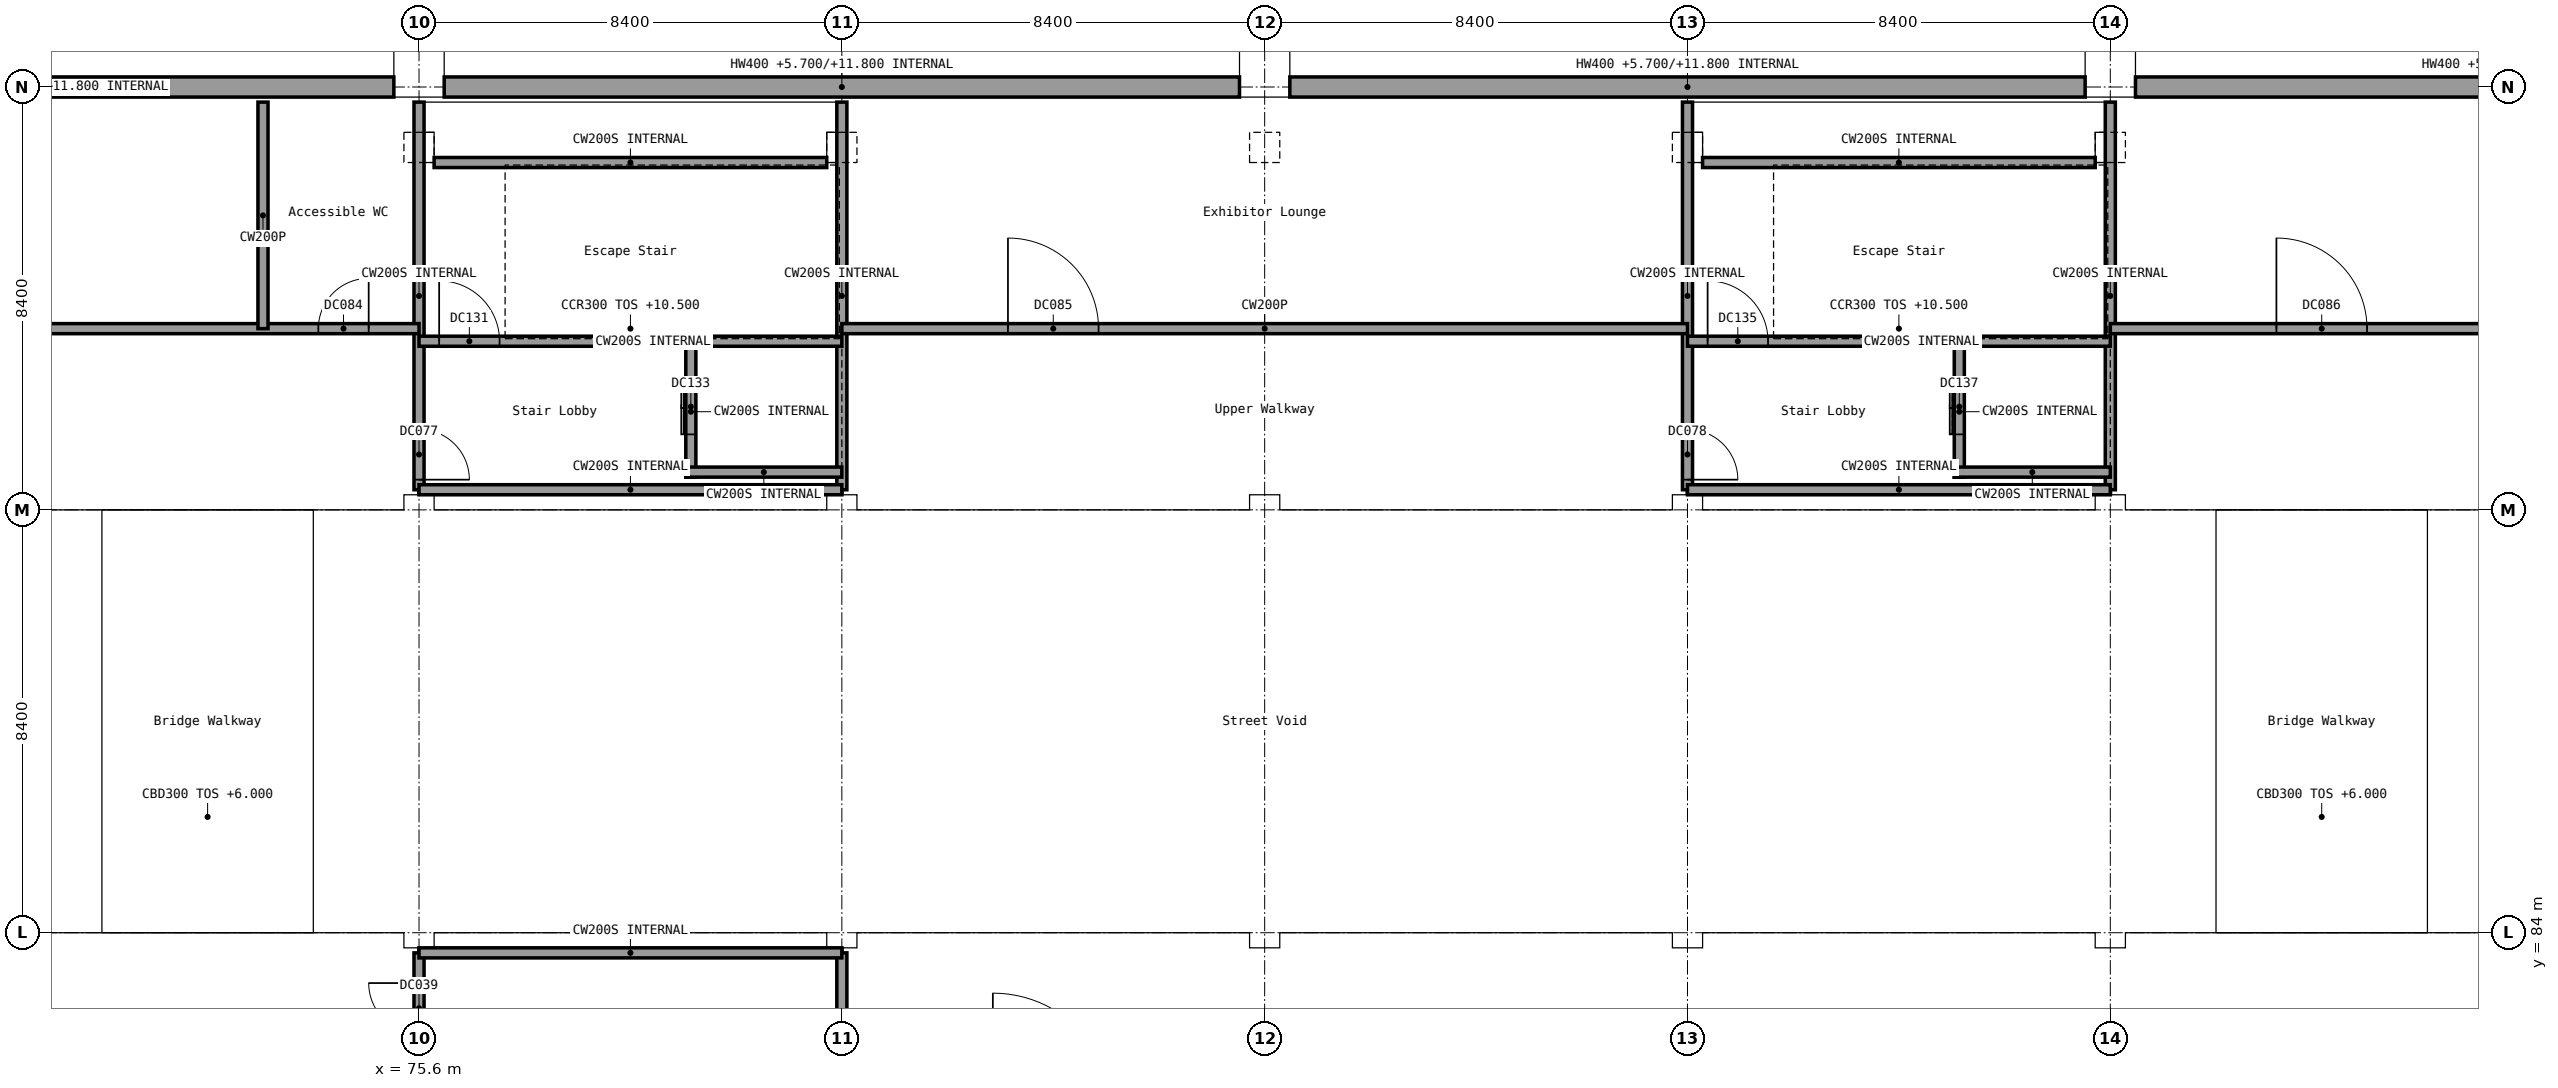
"""IFC4 building model, lengths in metres.
Left out: names, types, materials, properties, quantities, classifications, styles, units other than length and angle.
Written with IfcOpenShell. Run it as: python <this file> out.ifc"""

import sys

from ifc_helpers import new_model, si_unit, direction, frame, frame_2d, origin, origin_2d, place, context, subcontext, project, spatial, rectangle, extrude, element, fill, save


model = new_model("IFC4")
c1 = context("Model", 3, precision=1e-05, world=origin(), true_north=direction((0.0, 1.0)))
c2 = subcontext(c1, "Body", "Model", "MODEL_VIEW")
j1 = project(units=[si_unit("LENGTHUNIT", "METRE"), si_unit("PLANEANGLEUNIT", "RADIAN")], contexts=[c1])
p1 = place(None, origin())
s1 = spatial("IfcSite", under=j1, at=p1, CompositionType="ELEMENT")
p2 = place(p1, origin())
s2 = spatial("IfcBuilding", under=s1, at=p2, CompositionType="ELEMENT")
p3 = place(p2, frame((0.0, 0.0, 6.0)))
s3 = spatial("IfcBuildingStorey", under=s2, at=p3, CompositionType="ELEMENT", Elevation=6.0)
for number, where, z_axis, x_axis in (
    (1, (75.6, 100.8, 0.0), (0.0, 0.0, 1.0), (1.0, 0.0, 0.0)),
    (2, (92.4, 100.8, 0.0), (0.0, 0.0, 1.0), (1.0, 0.0, 0.0)),
    (3, (109.2, 100.8, 0.0), (0.0, 0.0, 1.0), (1.0, 0.0, 0.0)),
):
    element("IfcColumn", number, at=place(p3, frame(where, z_axis=z_axis, x_axis=x_axis)), inside=s3, PredefinedType="COLUMN", context=c2, shape_type="SweptSolid", body=[
        extrude(rectangle(XDim=1.0, YDim=1.6, at=origin_2d()), origin(), (0.0, 0.0, 1.0), 4.5),
    ])
p4 = place(p3, frame((59.3, 100.8, -0.3), z_axis=(0.0, 0.0, 1.0), x_axis=(1.0, 0.0, 0.0)))
e4 = element("IfcWall", 4, at=p4, inside=s3, PredefinedType="STANDARD", context=c2, shape_type="SweptSolid", body=[
    extrude(rectangle(XDim=15.8, YDim=0.4, at=frame_2d((7.9, 0.0))), origin(), (0.0, 0.0, 1.0), 6.1),
])
p5 = place(p3, frame((76.1, 100.8, -0.3), z_axis=(0.0, 0.0, 1.0), x_axis=(1.0, 0.0, 0.0)))
e5 = element("IfcWall", 5, at=p5, inside=s3, PredefinedType="STANDARD", context=c2, shape_type="SweptSolid", body=[
    extrude(rectangle(XDim=15.8, YDim=0.4, at=frame_2d((7.9, 0.0))), origin(), (0.0, 0.0, 1.0), 6.1),
])
for number, where, z_axis, x_axis in (
    (6, (92.9, 100.8, -0.3), (0.0, 0.0, 1.0), (1.0, 0.0, 0.0)),
    (7, (109.7, 100.8, -0.3), (0.0, 0.0, 1.0), (1.0, 0.0, 0.0)),
):
    element("IfcWall", number, at=place(p3, frame(where, z_axis=z_axis, x_axis=x_axis)), inside=s3, PredefinedType="STANDARD", context=c2, shape_type="SweptSolid", body=[
        extrude(rectangle(XDim=15.8, YDim=0.4, at=frame_2d((7.9, 0.0))), origin(), (0.0, 0.0, 1.0), 6.1),
    ])
for number, where, z_axis, x_axis in (
    (8, (75.6, 99.6, 0.0), (0.0, 0.0, 1.0), (1.0, 0.0, 0.0)),
    (9, (84.0, 99.6, 0.0), (0.0, 0.0, 1.0), (1.0, 0.0, 0.0)),
    (10, (92.4, 99.6, 0.0), (0.0, 0.0, 1.0), (1.0, 0.0, 0.0)),
    (11, (100.8, 99.6, 0.0), (0.0, 0.0, 1.0), (1.0, 0.0, 0.0)),
    (12, (109.2, 99.6, 0.0), (0.0, 0.0, 1.0), (1.0, 0.0, 0.0)),
):
    element("IfcColumn", number, at=place(p3, frame(where, z_axis=z_axis, x_axis=x_axis)), inside=s3, PredefinedType="COLUMN", context=c2, shape_type="SweptSolid", body=[
        extrude(rectangle(XDim=0.6, YDim=0.6, at=origin_2d()), origin(), (0.0, 0.0, 1.0), 4.5),
    ])
p6 = place(p3, frame((75.6, 75.4, 0.0), z_axis=(0.0, 0.0, 1.0), x_axis=(0.0, 1.0, 0.0)))
e13 = element("IfcWall", 13, at=p6, inside=s3, PredefinedType="SOLIDWALL", context=c2, shape_type="SweptSolid", body=[
    extrude(rectangle(XDim=8.2, YDim=0.2, at=frame_2d((4.1, 0.0))), origin(), (0.0, 0.0, 1.0), 4.2),
])
p7 = place(p6, frame((6.6, 0.0, 0.0)))
e14 = element("IfcOpeningElement", 14, at=p7, cuts=e13, PredefinedType="OPENING", context=c2, shape_type="SweptSolid", body=[
    extrude(rectangle(XDim=1.0, YDim=2.4, at=frame_2d((0.5, 1.2))), frame((0.0, 0.1, 0.0), z_axis=(0.0, -1.0, 0.0), x_axis=(1.0, 0.0, 0.0)), (0.0, 0.0, 1.0), 0.2),
])
p8 = place(p3, frame((84.0, 75.4, 0.0), z_axis=(0.0, 0.0, 1.0), x_axis=(0.0, 1.0, 0.0)))
e15 = element("IfcWall", 15, at=p8, inside=s3, PredefinedType="SOLIDWALL", context=c2, shape_type="SweptSolid", body=[
    extrude(rectangle(XDim=8.2, YDim=0.2, at=frame_2d((4.1, 0.0))), origin(), (0.0, 0.0, 1.0), 4.2),
])
p9 = place(p3, frame((75.6, 83.6, 0.0), z_axis=(0.0, 0.0, 1.0), x_axis=(1.0, 0.0, 0.0)))
e16 = element("IfcWall", 16, at=p9, inside=s3, PredefinedType="SOLIDWALL", context=c2, shape_type="SweptSolid", body=[
    extrude(rectangle(XDim=8.4, YDim=0.2, at=frame_2d((4.2, 0.0))), origin(), (0.0, 0.0, 1.0), 4.2),
])
p10 = place(p3, frame((75.6, 100.5, 0.0), z_axis=(0.0, 0.0, 1.0), x_axis=(0.0, -1.0, 0.0)))
e17 = element("IfcWall", 17, at=p10, inside=s3, PredefinedType="SOLIDWALL", context=c2, shape_type="SweptSolid", body=[
    extrude(rectangle(XDim=7.7, YDim=0.2, at=frame_2d((3.85, 0.0))), origin(), (0.0, 0.0, 1.0), 4.2),
])
p11 = place(p10, frame((6.5, 0.0, 0.0)))
e18 = element("IfcOpeningElement", 18, at=p11, cuts=e17, PredefinedType="OPENING", context=c2, shape_type="SweptSolid", body=[
    extrude(rectangle(XDim=1.0, YDim=2.4, at=frame_2d((0.5, 1.2))), frame((0.0, 0.1, 0.0), z_axis=(0.0, -1.0, 0.0), x_axis=(1.0, 0.0, 0.0)), (0.0, 0.0, 1.0), 0.2),
])
p12 = place(p3, frame((84.0, 100.5, 0.0), z_axis=(0.0, 0.0, 1.0), x_axis=(0.0, -1.0, 0.0)))
e19 = element("IfcWall", 19, at=p12, inside=s3, PredefinedType="SOLIDWALL", context=c2, shape_type="SweptSolid", body=[
    extrude(rectangle(XDim=7.7, YDim=0.2, at=frame_2d((3.85, 0.0))), origin(), (0.0, 0.0, 1.0), 4.2),
])
p13 = place(p3, frame((100.8, 100.5, 0.0), z_axis=(0.0, 0.0, 1.0), x_axis=(0.0, -1.0, 0.0)))
e20 = element("IfcWall", 20, at=p13, inside=s3, PredefinedType="SOLIDWALL", context=c2, shape_type="SweptSolid", body=[
    extrude(rectangle(XDim=7.7, YDim=0.2, at=frame_2d((3.85, 0.0))), origin(), (0.0, 0.0, 1.0), 4.2),
])
p14 = place(p13, frame((6.5, 0.0, 0.0)))
e21 = element("IfcOpeningElement", 21, at=p14, cuts=e20, PredefinedType="OPENING", context=c2, shape_type="SweptSolid", body=[
    extrude(rectangle(XDim=1.0, YDim=2.4, at=frame_2d((0.5, 1.2))), frame((0.0, 0.1, 0.0), z_axis=(0.0, -1.0, 0.0), x_axis=(1.0, 0.0, 0.0)), (0.0, 0.0, 1.0), 0.2),
])
p15 = place(p3, frame((109.2, 100.5, 0.0), z_axis=(0.0, 0.0, 1.0), x_axis=(0.0, -1.0, 0.0)))
e22 = element("IfcWall", 22, at=p15, inside=s3, PredefinedType="SOLIDWALL", context=c2, shape_type="SweptSolid", body=[
    extrude(rectangle(XDim=7.7, YDim=0.2, at=frame_2d((3.85, 0.0))), origin(), (0.0, 0.0, 1.0), 4.2),
])
p16 = place(p3, frame((58.8, 96.0, 0.0), z_axis=(0.0, 0.0, 1.0), x_axis=(1.0, 0.0, 0.0)))
e23 = element("IfcWall", 23, at=p16, inside=s3, PredefinedType="PARTITIONING", context=c2, shape_type="SweptSolid", body=[
    extrude(rectangle(XDim=16.8, YDim=0.2, at=frame_2d((8.4, 0.0))), origin(), (0.0, 0.0, 1.0), 4.5),
])
p17 = place(p16, frame((3.3, 0.0, 0.0)))
e24 = element("IfcOpeningElement", 24, at=p17, cuts=e23, PredefinedType="OPENING", context=c2, shape_type="SweptSolid", body=[
    extrude(rectangle(XDim=1.8, YDim=2.4, at=frame_2d((0.9, 1.2))), frame((0.0, 0.1, 0.0), z_axis=(0.0, -1.0, 0.0), x_axis=(1.0, 0.0, 0.0)), (0.0, 0.0, 1.0), 0.2),
])
p18 = place(p16, frame((14.8, 0.0, 0.0)))
e25 = element("IfcOpeningElement", 25, at=p18, cuts=e23, PredefinedType="OPENING", context=c2, shape_type="SweptSolid", body=[
    extrude(rectangle(XDim=1.0, YDim=2.4, at=frame_2d((0.5, 1.2))), frame((0.0, 0.1, 0.0), z_axis=(0.0, -1.0, 0.0), x_axis=(1.0, 0.0, 0.0)), (0.0, 0.0, 1.0), 0.2),
])
p19 = place(p3, frame((72.5, 100.5, 0.0), z_axis=(0.0, 0.0, 1.0), x_axis=(0.0, -1.0, 0.0)))
e26 = element("IfcWall", 26, at=p19, inside=s3, PredefinedType="PARTITIONING", context=c2, shape_type="SweptSolid", body=[
    extrude(rectangle(XDim=4.5, YDim=0.2, at=frame_2d((2.25, 0.0))), origin(), (0.0, 0.0, 1.0), 4.5),
])
p20 = place(p3, frame((84.0, 96.0, 0.0), z_axis=(0.0, 0.0, 1.0), x_axis=(1.0, 0.0, 0.0)))
e27 = element("IfcWall", 27, at=p20, inside=s3, PredefinedType="PARTITIONING", context=c2, shape_type="SweptSolid", body=[
    extrude(rectangle(XDim=16.8, YDim=0.2, at=frame_2d((8.4, 0.0))), origin(), (0.0, 0.0, 1.0), 4.5),
])
p21 = place(p20, frame((3.3, 0.0, 0.0)))
e28 = element("IfcOpeningElement", 28, at=p21, cuts=e27, PredefinedType="OPENING", context=c2, shape_type="SweptSolid", body=[
    extrude(rectangle(XDim=1.8, YDim=2.4, at=frame_2d((0.9, 1.2))), frame((0.0, 0.1, 0.0), z_axis=(0.0, -1.0, 0.0), x_axis=(1.0, 0.0, 0.0)), (0.0, 0.0, 1.0), 0.2),
])
p22 = place(p3, frame((109.2, 96.0, 0.0), z_axis=(0.0, 0.0, 1.0), x_axis=(1.0, 0.0, 0.0)))
e29 = element("IfcWall", 29, at=p22, inside=s3, PredefinedType="PARTITIONING", context=c2, shape_type="SweptSolid", body=[
    extrude(rectangle(XDim=16.8, YDim=0.2, at=frame_2d((8.4, 0.0))), origin(), (0.0, 0.0, 1.0), 4.5),
])
p23 = place(p22, frame((3.3, 0.0, 0.0)))
e30 = element("IfcOpeningElement", 30, at=p23, cuts=e29, PredefinedType="OPENING", context=c2, shape_type="SweptSolid", body=[
    extrude(rectangle(XDim=1.8, YDim=2.4, at=frame_2d((0.9, 1.2))), frame((0.0, 0.1, 0.0), z_axis=(0.0, -1.0, 0.0), x_axis=(1.0, 0.0, 0.0)), (0.0, 0.0, 1.0), 0.2),
])
for number, where, z_axis, x_axis in (
    (31, (75.6, 92.8, 0.0), (0.0, 0.0, 1.0), (1.0, 0.0, 0.0)),
    (32, (100.8, 92.8, 0.0), (0.0, 0.0, 1.0), (1.0, 0.0, 0.0)),
):
    element("IfcWall", number, at=place(p3, frame(where, z_axis=z_axis, x_axis=x_axis)), inside=s3, PredefinedType="SOLIDWALL", context=c2, shape_type="SweptSolid", body=[
        extrude(rectangle(XDim=8.4, YDim=0.2, at=frame_2d((4.2, 0.0))), origin(), (0.0, 0.0, 1.0), 4.2),
    ])
p24 = place(p3, frame((75.9, 99.3, 0.0), z_axis=(0.0, 0.0, 1.0), x_axis=(1.0, 0.0, 0.0)))
e33 = element("IfcWall", 33, at=p24, inside=s3, PredefinedType="SOLIDWALL", context=c2, shape_type="SweptSolid", body=[
    extrude(rectangle(XDim=7.8, YDim=0.2, at=frame_2d((3.9, 0.0))), origin(), (0.0, 0.0, 1.0), 4.2),
])
p25 = place(p3, frame((75.6, 95.75, 0.0), z_axis=(0.0, 0.0, 1.0), x_axis=(1.0, 0.0, 0.0)))
e34 = element("IfcWall", 34, at=p25, inside=s3, PredefinedType="SOLIDWALL", context=c2, shape_type="SweptSolid", body=[
    extrude(rectangle(XDim=8.4, YDim=0.2, at=frame_2d((4.2, 0.0))), origin(), (0.0, 0.0, 1.0), 4.2),
])
p26 = place(p25, frame((0.4, 0.0, 0.0)))
e35 = element("IfcOpeningElement", 35, at=p26, cuts=e34, PredefinedType="OPENING", context=c2, shape_type="SweptSolid", body=[
    extrude(rectangle(XDim=1.2, YDim=2.4, at=frame_2d((0.6, 1.2))), frame((0.0, 0.1, 0.0), z_axis=(0.0, -1.0, 0.0), x_axis=(1.0, 0.0, 0.0)), (0.0, 0.0, 1.0), 0.2),
])
p27 = place(p3, frame((81.0, 93.05, 0.0), z_axis=(0.0, 0.0, 1.0), x_axis=(0.0, 1.0, 0.0)))
e36 = element("IfcWall", 36, at=p27, inside=s3, PredefinedType="SOLIDWALL", context=c2, shape_type="SweptSolid", body=[
    extrude(rectangle(XDim=2.6, YDim=0.2, at=frame_2d((1.3, 0.0))), origin(), (0.0, 0.0, 1.0), 4.2),
])
p28 = place(p27, frame((0.85, 0.0, 0.0)))
e37 = element("IfcOpeningElement", 37, at=p28, cuts=e36, PredefinedType="OPENING", context=c2, shape_type="SweptSolid", body=[
    extrude(rectangle(XDim=1.1, YDim=2.1, at=frame_2d((0.55, 1.05))), frame((0.0, 0.1, 0.0), z_axis=(0.0, -1.0, 0.0), x_axis=(1.0, 0.0, 0.0)), (0.0, 0.0, 1.0), 0.2),
])
p29 = place(p3, frame((80.9, 93.15, 0.0), z_axis=(0.0, 0.0, 1.0), x_axis=(1.0, 0.0, 0.0)))
e38 = element("IfcWall", 38, at=p29, inside=s3, PredefinedType="SOLIDWALL", context=c2, shape_type="SweptSolid", body=[
    extrude(rectangle(XDim=3.1, YDim=0.2, at=frame_2d((1.55, 0.0))), origin(), (0.0, 0.0, 1.0), 4.2),
])
p30 = place(p3, frame((101.1, 99.3, 0.0), z_axis=(0.0, 0.0, 1.0), x_axis=(1.0, 0.0, 0.0)))
e39 = element("IfcWall", 39, at=p30, inside=s3, PredefinedType="SOLIDWALL", context=c2, shape_type="SweptSolid", body=[
    extrude(rectangle(XDim=7.8, YDim=0.2, at=frame_2d((3.9, 0.0))), origin(), (0.0, 0.0, 1.0), 4.2),
])
p31 = place(p3, frame((100.8, 95.75, 0.0), z_axis=(0.0, 0.0, 1.0), x_axis=(1.0, 0.0, 0.0)))
e40 = element("IfcWall", 40, at=p31, inside=s3, PredefinedType="SOLIDWALL", context=c2, shape_type="SweptSolid", body=[
    extrude(rectangle(XDim=8.4, YDim=0.2, at=frame_2d((4.2, 0.0))), origin(), (0.0, 0.0, 1.0), 4.2),
])
p32 = place(p31, frame((0.4, 0.0, 0.0)))
e41 = element("IfcOpeningElement", 41, at=p32, cuts=e40, PredefinedType="OPENING", context=c2, shape_type="SweptSolid", body=[
    extrude(rectangle(XDim=1.2, YDim=2.4, at=frame_2d((0.6, 1.2))), frame((0.0, 0.1, 0.0), z_axis=(0.0, -1.0, 0.0), x_axis=(1.0, 0.0, 0.0)), (0.0, 0.0, 1.0), 0.2),
])
p33 = place(p3, frame((106.2, 93.05, 0.0), z_axis=(0.0, 0.0, 1.0), x_axis=(0.0, 1.0, 0.0)))
e42 = element("IfcWall", 42, at=p33, inside=s3, PredefinedType="SOLIDWALL", context=c2, shape_type="SweptSolid", body=[
    extrude(rectangle(XDim=2.6, YDim=0.2, at=frame_2d((1.3, 0.0))), origin(), (0.0, 0.0, 1.0), 4.2),
])
p34 = place(p33, frame((0.85, 0.0, 0.0)))
e43 = element("IfcOpeningElement", 43, at=p34, cuts=e42, PredefinedType="OPENING", context=c2, shape_type="SweptSolid", body=[
    extrude(rectangle(XDim=1.1, YDim=2.1, at=frame_2d((0.55, 1.05))), frame((0.0, 0.1, 0.0), z_axis=(0.0, -1.0, 0.0), x_axis=(1.0, 0.0, 0.0)), (0.0, 0.0, 1.0), 0.2),
])
p35 = place(p3, frame((106.1, 93.15, 0.0), z_axis=(0.0, 0.0, 1.0), x_axis=(1.0, 0.0, 0.0)))
e44 = element("IfcWall", 44, at=p35, inside=s3, PredefinedType="SOLIDWALL", context=c2, shape_type="SweptSolid", body=[
    extrude(rectangle(XDim=3.1, YDim=0.2, at=frame_2d((1.55, 0.0))), origin(), (0.0, 0.0, 1.0), 4.2),
])
p36 = place(p7, origin())
e45 = element("IfcDoor", 45, at=p36, inside=s3, OperationType="SINGLE_SWING_RIGHT", PredefinedType="DOOR", context=c2, shape_type="SweptSolid", body=[
    extrude(rectangle(XDim=1.0, YDim=2.4, at=frame_2d((0.5, 1.2))), frame((0.0, 0.025, 0.0), z_axis=(0.0, -1.0, 0.0), x_axis=(1.0, 0.0, 0.0)), (0.0, 0.0, 1.0), 0.05),
])
fill(e14, e45)
p37 = place(p11, origin())
e46 = element("IfcDoor", 46, at=p37, inside=s3, OperationType="SINGLE_SWING_RIGHT", PredefinedType="DOOR", context=c2, shape_type="SweptSolid", body=[
    extrude(rectangle(XDim=1.0, YDim=2.4, at=frame_2d((0.5, 1.2))), frame((0.0, 0.025, 0.0), z_axis=(0.0, -1.0, 0.0), x_axis=(1.0, 0.0, 0.0)), (0.0, 0.0, 1.0), 0.05),
])
fill(e18, e46)
p38 = place(p14, origin())
e47 = element("IfcDoor", 47, at=p38, inside=s3, OperationType="SINGLE_SWING_RIGHT", PredefinedType="DOOR", context=c2, shape_type="SweptSolid", body=[
    extrude(rectangle(XDim=1.0, YDim=2.4, at=frame_2d((0.5, 1.2))), frame((0.0, 0.025, 0.0), z_axis=(0.0, -1.0, 0.0), x_axis=(1.0, 0.0, 0.0)), (0.0, 0.0, 1.0), 0.05),
])
fill(e21, e47)
p39 = place(p18, origin())
e48 = element("IfcDoor", 48, at=p39, inside=s3, OperationType="SINGLE_SWING_RIGHT", PredefinedType="DOOR", context=c2, shape_type="SweptSolid", body=[
    extrude(rectangle(XDim=1.0, YDim=2.4, at=frame_2d((0.5, 1.2))), frame((0.0, 0.025, 0.0), z_axis=(0.0, -1.0, 0.0), x_axis=(1.0, 0.0, 0.0)), (0.0, 0.0, 1.0), 0.05),
])
fill(e25, e48)
p40 = place(p21, origin())
e49 = element("IfcDoor", 49, at=p40, inside=s3, OperationType="DOUBLE_DOOR_DOUBLE_SWING", PredefinedType="DOOR", context=c2, shape_type="SweptSolid", body=[
    extrude(rectangle(XDim=1.8, YDim=2.4, at=frame_2d((0.9, 1.2))), frame((0.0, 0.025, 0.0), z_axis=(0.0, -1.0, 0.0), x_axis=(1.0, 0.0, 0.0)), (0.0, 0.0, 1.0), 0.05),
])
fill(e28, e49)
p41 = place(p23, origin())
e50 = element("IfcDoor", 50, at=p41, inside=s3, OperationType="DOUBLE_DOOR_DOUBLE_SWING", PredefinedType="DOOR", context=c2, shape_type="SweptSolid", body=[
    extrude(rectangle(XDim=1.8, YDim=2.4, at=frame_2d((0.9, 1.2))), frame((0.0, 0.025, 0.0), z_axis=(0.0, -1.0, 0.0), x_axis=(1.0, 0.0, 0.0)), (0.0, 0.0, 1.0), 0.05),
])
fill(e30, e50)
p42 = place(p26, origin())
e51 = element("IfcDoor", 51, at=p42, inside=s3, OperationType="SINGLE_SWING_LEFT", PredefinedType="DOOR", context=c2, shape_type="SweptSolid", body=[
    extrude(rectangle(XDim=1.2, YDim=2.4, at=frame_2d((0.6, 1.2))), frame((0.0, 0.025, 0.0), z_axis=(0.0, -1.0, 0.0), x_axis=(1.0, 0.0, 0.0)), (0.0, 0.0, 1.0), 0.05),
])
fill(e35, e51)
p43 = place(p28, origin())
e52 = element("IfcDoor", 52, at=p43, inside=s3, OperationType="DOUBLE_DOOR_SLIDING", PredefinedType="DOOR", context=c2, shape_type="SweptSolid", body=[
    extrude(rectangle(XDim=1.1, YDim=2.1, at=frame_2d((0.55, 1.05))), frame((0.0, 0.025, 0.0), z_axis=(0.0, -1.0, 0.0), x_axis=(1.0, 0.0, 0.0)), (0.0, 0.0, 1.0), 0.05),
])
fill(e37, e52)
p44 = place(p32, origin())
e53 = element("IfcDoor", 53, at=p44, inside=s3, OperationType="SINGLE_SWING_LEFT", PredefinedType="DOOR", context=c2, shape_type="SweptSolid", body=[
    extrude(rectangle(XDim=1.2, YDim=2.4, at=frame_2d((0.6, 1.2))), frame((0.0, 0.025, 0.0), z_axis=(0.0, -1.0, 0.0), x_axis=(1.0, 0.0, 0.0)), (0.0, 0.0, 1.0), 0.05),
])
fill(e41, e53)
p45 = place(p34, origin())
e54 = element("IfcDoor", 54, at=p45, inside=s3, OperationType="DOUBLE_DOOR_SLIDING", PredefinedType="DOOR", context=c2, shape_type="SweptSolid", body=[
    extrude(rectangle(XDim=1.1, YDim=2.1, at=frame_2d((0.55, 1.05))), frame((0.0, 0.025, 0.0), z_axis=(0.0, -1.0, 0.0), x_axis=(1.0, 0.0, 0.0)), (0.0, 0.0, 1.0), 0.05),
])
fill(e43, e54)
save(model, sys.argv[1])
